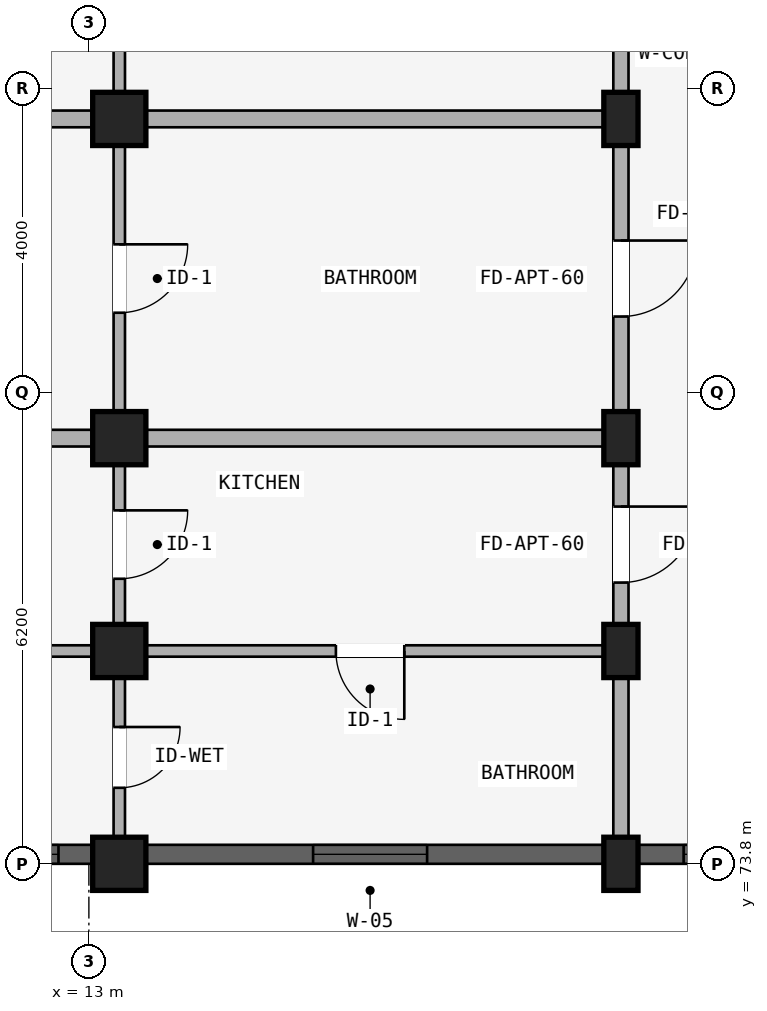
"""IFC4 building model, lengths in metres.
Left out: names, types, materials, properties, quantities, classifications, styles, units other than length and angle.
Written with IfcOpenShell. Run it as: python <this file> out.ifc"""

import sys

from ifc_helpers import new_model, si_unit, direction, frame, frame_2d, origin, origin_2d, place, context, subcontext, project, spatial, rectangle, extrude, element, fill, save


model = new_model("IFC4")
c1 = context("Model", 3, precision=1e-05, world=origin(), true_north=direction((0.0, 1.0)))
c2 = subcontext(c1, "Body", "Model", "MODEL_VIEW")
j1 = project(units=[si_unit("LENGTHUNIT", "METRE"), si_unit("PLANEANGLEUNIT", "RADIAN")], contexts=[c1])
p1 = place(None, origin())
s1 = spatial("IfcSite", under=j1, at=p1, CompositionType="ELEMENT")
p2 = place(p1, origin())
s2 = spatial("IfcBuilding", under=s1, at=p2, CompositionType="ELEMENT")
p3 = place(p2, frame((0.0, 0.0, 24.45)))
s3 = spatial("IfcBuildingStorey", under=s2, at=p3, CompositionType="ELEMENT", Elevation=24.45)
p4 = place(p3, frame((20.0, 83.6, 0.0), z_axis=(0.0, 0.0, 1.0), x_axis=(1.0, 0.0, 0.0)))
e1 = element("IfcColumn", 1, at=p4, inside=s3, PredefinedType="COLUMN", context=c2, shape_type="SweptSolid", body=[
    extrude(rectangle(XDim=0.45, YDim=0.7, at=origin_2d()), origin(), (0.0, 0.0, 1.0), 2.93),
])
p5 = place(p3, frame((13.4, 83.6, 0.0), z_axis=(0.0, 0.0, 1.0), x_axis=(1.0, 0.0, 0.0)))
e2 = element("IfcColumn", 2, at=p5, inside=s3, PredefinedType="COLUMN", context=c2, shape_type="SweptSolid", body=[
    extrude(rectangle(XDim=0.7, YDim=0.7, at=origin_2d()), origin(), (0.0, 0.0, 1.0), 2.93),
])
p6 = place(p3, frame((20.0, 79.4, 0.0), z_axis=(0.0, 0.0, 1.0), x_axis=(1.0, 0.0, 0.0)))
e3 = element("IfcColumn", 3, at=p6, inside=s3, PredefinedType="COLUMN", context=c2, shape_type="SweptSolid", body=[
    extrude(rectangle(XDim=0.45, YDim=0.7, at=origin_2d()), origin(), (0.0, 0.0, 1.0), 2.93),
])
p7 = place(p3, frame((13.4, 79.4, 0.0), z_axis=(0.0, 0.0, 1.0), x_axis=(1.0, 0.0, 0.0)))
e4 = element("IfcColumn", 4, at=p7, inside=s3, PredefinedType="COLUMN", context=c2, shape_type="SweptSolid", body=[
    extrude(rectangle(XDim=0.7, YDim=0.7, at=origin_2d()), origin(), (0.0, 0.0, 1.0), 2.93),
])
p8 = place(p3, frame((20.0, 76.6, 0.0), z_axis=(0.0, 0.0, 1.0), x_axis=(1.0, 0.0, 0.0)))
e5 = element("IfcColumn", 5, at=p8, inside=s3, PredefinedType="COLUMN", context=c2, shape_type="SweptSolid", body=[
    extrude(rectangle(XDim=0.45, YDim=0.7, at=origin_2d()), origin(), (0.0, 0.0, 1.0), 2.93),
])
p9 = place(p3, frame((13.4, 76.6, 0.0), z_axis=(0.0, 0.0, 1.0), x_axis=(1.0, 0.0, 0.0)))
e6 = element("IfcColumn", 6, at=p9, inside=s3, PredefinedType="COLUMN", context=c2, shape_type="SweptSolid", body=[
    extrude(rectangle(XDim=0.7, YDim=0.7, at=origin_2d()), origin(), (0.0, 0.0, 1.0), 2.93),
])
p10 = place(p3, frame((20.0, 73.8, 0.0), z_axis=(0.0, 0.0, 1.0), x_axis=(1.0, 0.0, 0.0)))
e7 = element("IfcColumn", 7, at=p10, inside=s3, PredefinedType="COLUMN", context=c2, shape_type="SweptSolid", body=[
    extrude(rectangle(XDim=0.45, YDim=0.7, at=origin_2d()), origin(), (0.0, 0.0, 1.0), 2.97),
])
p11 = place(p3, frame((13.4, 73.8, 0.0), z_axis=(0.0, 0.0, 1.0), x_axis=(1.0, 0.0, 0.0)))
e8 = element("IfcColumn", 8, at=p11, inside=s3, PredefinedType="COLUMN", context=c2, shape_type="SweptSolid", body=[
    extrude(rectangle(XDim=0.7, YDim=0.7, at=origin_2d()), origin(), (0.0, 0.0, 1.0), 2.97),
])
p12 = place(p3, frame((20.0, 87.65, 0.0), z_axis=(0.0, 0.0, 1.0), x_axis=(0.0, -1.0, 0.0)))
e9 = element("IfcWall", 9, at=p12, inside=s3, PredefinedType="STANDARD", context=c2, shape_type="SweptSolid", body=[
    extrude(rectangle(XDim=4.05, YDim=0.2, at=frame_2d((2.025, 0.0))), origin(), (0.0, 0.0, 1.0), 2.372),
])
p13 = place(p12, frame((1.525, 0.0, 0.0)))
e10 = element("IfcOpeningElement", 10, at=p13, cuts=e9, PredefinedType="OPENING", context=c2, shape_type="SweptSolid", body=[
    extrude(rectangle(XDim=1.0, YDim=2.15, at=frame_2d((0.5, 1.075))), frame((0.0, 0.11, 0.0), z_axis=(0.0, -1.0, 0.0), x_axis=(1.0, 0.0, 0.0)), (0.0, 0.0, 1.0), 0.22),
])
p14 = place(p3, frame((13.4, 87.57, 0.0), z_axis=(0.0, 0.0, 1.0), x_axis=(0.0, -1.0, 0.0)))
e11 = element("IfcWall", 11, at=p14, inside=s3, PredefinedType="PARTITIONING", context=c2, shape_type="SweptSolid", body=[
    extrude(rectangle(XDim=3.89, YDim=0.15, at=frame_2d((1.945, 0.0))), origin(), (0.0, 0.0, 1.0), 2.372),
])
p15 = place(p14, frame((1.495, 0.0, 0.0)))
e12 = element("IfcOpeningElement", 12, at=p15, cuts=e11, PredefinedType="OPENING", context=c2, shape_type="SweptSolid", body=[
    extrude(rectangle(XDim=0.9, YDim=2.1, at=frame_2d((0.45, 1.05))), frame((0.0, 0.085, 0.0), z_axis=(0.0, -1.0, 0.0), x_axis=(1.0, 0.0, 0.0)), (0.0, 0.0, 1.0), 0.17),
])
p16 = place(p3, frame((20.0, 83.6, 0.0), z_axis=(0.0, 0.0, 1.0), x_axis=(0.0, -1.0, 0.0)))
e13 = element("IfcWall", 13, at=p16, inside=s3, PredefinedType="STANDARD", context=c2, shape_type="SweptSolid", body=[
    extrude(rectangle(XDim=4.2, YDim=0.2, at=frame_2d((2.1, 0.0))), origin(), (0.0, 0.0, 1.0), 2.372),
])
p17 = place(p16, frame((1.6, 0.0, 0.0)))
e14 = element("IfcOpeningElement", 14, at=p17, cuts=e13, PredefinedType="OPENING", context=c2, shape_type="SweptSolid", body=[
    extrude(rectangle(XDim=1.0, YDim=2.15, at=frame_2d((0.5, 1.075))), frame((0.0, 0.11, 0.0), z_axis=(0.0, -1.0, 0.0), x_axis=(1.0, 0.0, 0.0)), (0.0, 0.0, 1.0), 0.22),
])
p18 = place(p3, frame((13.4, 83.52, 0.0), z_axis=(0.0, 0.0, 1.0), x_axis=(0.0, -1.0, 0.0)))
e15 = element("IfcWall", 15, at=p18, inside=s3, PredefinedType="PARTITIONING", context=c2, shape_type="SweptSolid", body=[
    extrude(rectangle(XDim=4.04, YDim=0.15, at=frame_2d((2.02, 0.0))), origin(), (0.0, 0.0, 1.0), 2.372),
])
p19 = place(p18, frame((1.57, 0.0, 0.0)))
e16 = element("IfcOpeningElement", 16, at=p19, cuts=e15, PredefinedType="OPENING", context=c2, shape_type="SweptSolid", body=[
    extrude(rectangle(XDim=0.9, YDim=2.1, at=frame_2d((0.45, 1.05))), frame((0.0, 0.085, 0.0), z_axis=(0.0, -1.0, 0.0), x_axis=(1.0, 0.0, 0.0)), (0.0, 0.0, 1.0), 0.17),
])
p20 = place(p3, frame((19.95, 83.6, 0.0), z_axis=(0.0, 0.0, 1.0), x_axis=(-1.0, 0.0, 0.0)))
e17 = element("IfcWall", 17, at=p20, inside=s3, PredefinedType="STANDARD", context=c2, shape_type="SweptSolid", body=[
    extrude(rectangle(XDim=17.53, YDim=0.22, at=frame_2d((8.765, 0.0))), origin(), (0.0, 0.0, 1.0), 2.372),
])
p21 = place(p3, frame((20.0, 79.4, 0.0), z_axis=(0.0, 0.0, 1.0), x_axis=(0.0, -1.0, 0.0)))
e18 = element("IfcWall", 18, at=p21, inside=s3, PredefinedType="STANDARD", context=c2, shape_type="SweptSolid", body=[
    extrude(rectangle(XDim=2.8, YDim=0.2, at=frame_2d((1.4, 0.0))), origin(), (0.0, 0.0, 1.0), 2.372),
])
p22 = place(p21, frame((0.9, 0.0, 0.0)))
e19 = element("IfcOpeningElement", 19, at=p22, cuts=e18, PredefinedType="OPENING", context=c2, shape_type="SweptSolid", body=[
    extrude(rectangle(XDim=1.0, YDim=2.15, at=frame_2d((0.5, 1.075))), frame((0.0, 0.11, 0.0), z_axis=(0.0, -1.0, 0.0), x_axis=(1.0, 0.0, 0.0)), (0.0, 0.0, 1.0), 0.22),
])
p23 = place(p3, frame((13.4, 79.32, 0.0), z_axis=(0.0, 0.0, 1.0), x_axis=(0.0, -1.0, 0.0)))
e20 = element("IfcWall", 20, at=p23, inside=s3, PredefinedType="PLUMBINGWALL", context=c2, shape_type="SweptSolid", body=[
    extrude(rectangle(XDim=2.64, YDim=0.15, at=frame_2d((1.32, 0.0))), origin(), (0.0, 0.0, 1.0), 2.372),
])
p24 = place(p23, frame((0.87, 0.0, 0.0)))
e21 = element("IfcOpeningElement", 21, at=p24, cuts=e20, PredefinedType="OPENING", context=c2, shape_type="SweptSolid", body=[
    extrude(rectangle(XDim=0.9, YDim=2.1, at=frame_2d((0.45, 1.05))), frame((0.0, 0.085, 0.0), z_axis=(0.0, -1.0, 0.0), x_axis=(1.0, 0.0, 0.0)), (0.0, 0.0, 1.0), 0.17),
])
p25 = place(p3, frame((19.9, 79.4, 0.0), z_axis=(0.0, 0.0, 1.0), x_axis=(-1.0, 0.0, 0.0)))
e22 = element("IfcWall", 22, at=p25, inside=s3, PredefinedType="STANDARD", context=c2, shape_type="SweptSolid", body=[
    extrude(rectangle(XDim=17.42, YDim=0.22, at=frame_2d((8.71, 0.0))), origin(), (0.0, 0.0, 1.0), 2.372),
])
p26 = place(p3, frame((20.0, 76.6, 0.0), z_axis=(0.0, 0.0, 1.0), x_axis=(0.0, -1.0, 0.0)))
e23 = element("IfcWall", 23, at=p26, inside=s3, PredefinedType="STANDARD", context=c2, shape_type="SweptSolid", body=[
    extrude(rectangle(XDim=2.8, YDim=0.2, at=frame_2d((1.4, 0.0))), origin(), (0.0, 0.0, 1.0), 2.372),
])
p27 = place(p3, frame((13.4, 76.52, 0.0), z_axis=(0.0, 0.0, 1.0), x_axis=(0.0, -1.0, 0.0)))
e24 = element("IfcWall", 24, at=p27, inside=s3, PredefinedType="PLUMBINGWALL", context=c2, shape_type="SweptSolid", body=[
    extrude(rectangle(XDim=2.64, YDim=0.15, at=frame_2d((1.32, 0.0))), origin(), (0.0, 0.0, 1.0), 2.372),
])
p28 = place(p27, frame((0.92, 0.0, 0.0)))
e25 = element("IfcOpeningElement", 25, at=p28, cuts=e24, PredefinedType="OPENING", context=c2, shape_type="SweptSolid", body=[
    extrude(rectangle(XDim=0.8, YDim=2.1, at=frame_2d((0.4, 1.05))), frame((0.0, 0.085, 0.0), z_axis=(0.0, -1.0, 0.0), x_axis=(1.0, 0.0, 0.0)), (0.0, 0.0, 1.0), 0.17),
])
p29 = place(p3, frame((19.9, 76.6, 0.0), z_axis=(0.0, 0.0, 1.0), x_axis=(-1.0, 0.0, 0.0)))
e26 = element("IfcWall", 26, at=p29, inside=s3, PredefinedType="PARTITIONING", context=c2, shape_type="SweptSolid", body=[
    extrude(rectangle(XDim=17.42, YDim=0.15, at=frame_2d((8.71, 0.0))), origin(), (0.0, 0.0, 1.0), 2.372),
])
p30 = place(p29, frame((2.75, 0.0, 0.0)))
e27 = element("IfcOpeningElement", 27, at=p30, cuts=e26, PredefinedType="OPENING", context=c2, shape_type="SweptSolid", body=[
    extrude(rectangle(XDim=0.9, YDim=2.1, at=frame_2d((0.45, 1.05))), frame((0.0, 0.085, 0.0), z_axis=(0.0, -1.0, 0.0), x_axis=(1.0, 0.0, 0.0)), (0.0, 0.0, 1.0), 0.17),
])
p31 = place(p3, frame((22.171, 73.925, 0.0), z_axis=(0.0, 0.0, 1.0), x_axis=(-1.0, 0.0, 0.0)))
e28 = element("IfcWall", 28, at=p31, inside=s3, PredefinedType="STANDARD", context=c2, shape_type="SweptSolid", body=[
    extrude(rectangle(XDim=1.943, YDim=0.25, at=frame_2d((0.971, 0.0))), origin(), (0.0, 0.0, 1.0), 2.372),
])
p32 = place(p31, frame((0.596, 0.0, 0.88)))
e29 = element("IfcOpeningElement", 29, at=p32, cuts=e28, PredefinedType="OPENING", context=c2, shape_type="SweptSolid", body=[
    extrude(rectangle(XDim=0.75, YDim=1.05, at=frame_2d((0.375, 0.525))), frame((0.0, 0.135, 0.0), z_axis=(0.0, -1.0, 0.0), x_axis=(1.0, 0.0, 0.0)), (0.0, 0.0, 1.0), 0.27),
])
p33 = place(p3, frame((19.771, 73.925, 0.0), z_axis=(0.0, 0.0, 1.0), x_axis=(-1.0, 0.0, 0.0)))
e30 = element("IfcWall", 30, at=p33, inside=s3, PredefinedType="STANDARD", context=c2, shape_type="SweptSolid", body=[
    extrude(rectangle(XDim=6.018, YDim=0.25, at=frame_2d((3.009, 0.0))), origin(), (0.0, 0.0, 1.0), 2.372),
])
p34 = place(p33, frame((2.322, 0.0, 0.522)))
e31 = element("IfcOpeningElement", 31, at=p34, cuts=e30, PredefinedType="OPENING", context=c2, shape_type="SweptSolid", body=[
    extrude(rectangle(XDim=1.5, YDim=1.65, at=frame_2d((0.75, 0.825))), frame((0.0, 0.135, 0.0), z_axis=(0.0, -1.0, 0.0), x_axis=(1.0, 0.0, 0.0)), (0.0, 0.0, 1.0), 0.27),
])
p35 = place(p3, frame((13.046, 73.925, 0.0), z_axis=(0.0, 0.0, 1.0), x_axis=(-1.0, 0.0, 0.0)))
e32 = element("IfcWall", 32, at=p35, inside=s3, PredefinedType="STANDARD", context=c2, shape_type="SweptSolid", body=[
    extrude(rectangle(XDim=2.093, YDim=0.25, at=frame_2d((1.046, 0.0))), origin(), (0.0, 0.0, 1.0), 2.372),
])
p36 = place(p35, frame((0.447, 0.0, 0.672)))
e33 = element("IfcOpeningElement", 33, at=p36, cuts=e32, PredefinedType="OPENING", context=c2, shape_type="SweptSolid", body=[
    extrude(rectangle(XDim=1.2, YDim=1.5, at=frame_2d((0.6, 0.75))), frame((0.0, 0.135, 0.0), z_axis=(0.0, -1.0, 0.0), x_axis=(1.0, 0.0, 0.0)), (0.0, 0.0, 1.0), 0.27),
])
p37 = place(p32, origin())
e34 = element("IfcWindow", 34, at=p37, inside=s3, PartitioningType="SINGLE_PANEL", PredefinedType="WINDOW", context=c2, shape_type="SweptSolid", body=[
    extrude(rectangle(XDim=0.75, YDim=1.05, at=frame_2d((0.375, 0.525))), frame((0.0, 0.03, 0.0), z_axis=(0.0, -1.0, 0.0), x_axis=(1.0, 0.0, 0.0)), (0.0, 0.0, 1.0), 0.06),
])
fill(e29, e34)
p38 = place(p34, origin())
e35 = element("IfcWindow", 35, at=p38, inside=s3, PartitioningType="DOUBLE_PANEL_VERTICAL", PredefinedType="WINDOW", context=c2, shape_type="SweptSolid", body=[
    extrude(rectangle(XDim=1.5, YDim=1.65, at=frame_2d((0.75, 0.825))), frame((0.0, 0.03, 0.0), z_axis=(0.0, -1.0, 0.0), x_axis=(1.0, 0.0, 0.0)), (0.0, 0.0, 1.0), 0.06),
])
fill(e31, e35)
p39 = place(p36, origin())
e36 = element("IfcWindow", 36, at=p39, inside=s3, PartitioningType="SINGLE_PANEL", PredefinedType="WINDOW", context=c2, shape_type="SweptSolid", body=[
    extrude(rectangle(XDim=1.2, YDim=1.5, at=frame_2d((0.6, 0.75))), frame((0.0, 0.03, 0.0), z_axis=(0.0, -1.0, 0.0), x_axis=(1.0, 0.0, 0.0)), (0.0, 0.0, 1.0), 0.06),
])
fill(e33, e36)
p40 = place(p17, origin())
e37 = element("IfcDoor", 37, at=p40, inside=s3, OperationType="SINGLE_SWING_LEFT", PredefinedType="DOOR", context=c2, shape_type="SweptSolid", body=[
    extrude(rectangle(XDim=1.0, YDim=2.15, at=frame_2d((0.5, 1.075))), frame((0.0, 0.025, 0.0), z_axis=(0.0, -1.0, 0.0), x_axis=(1.0, 0.0, 0.0)), (0.0, 0.0, 1.0), 0.05),
])
fill(e14, e37)
p41 = place(p19, frame((0.9, 0.0, 0.0), z_axis=(0.0, 0.0, 1.0), x_axis=(-1.0, 0.0, 0.0)))
e38 = element("IfcDoor", 38, at=p41, inside=s3, OperationType="SINGLE_SWING_RIGHT", PredefinedType="DOOR", context=c2, shape_type="SweptSolid", body=[
    extrude(rectangle(XDim=0.9, YDim=2.1, at=frame_2d((0.45, 1.05))), frame((0.0, 0.025, 0.0), z_axis=(0.0, -1.0, 0.0), x_axis=(1.0, 0.0, 0.0)), (0.0, 0.0, 1.0), 0.05),
])
fill(e16, e38)
p42 = place(p24, frame((0.9, 0.0, 0.0), z_axis=(0.0, 0.0, 1.0), x_axis=(-1.0, 0.0, 0.0)))
e39 = element("IfcDoor", 39, at=p42, inside=s3, OperationType="SINGLE_SWING_RIGHT", PredefinedType="DOOR", context=c2, shape_type="SweptSolid", body=[
    extrude(rectangle(XDim=0.9, YDim=2.1, at=frame_2d((0.45, 1.05))), frame((0.0, 0.025, 0.0), z_axis=(0.0, -1.0, 0.0), x_axis=(1.0, 0.0, 0.0)), (0.0, 0.0, 1.0), 0.05),
])
fill(e21, e39)
p43 = place(p22, origin())
e40 = element("IfcDoor", 40, at=p43, inside=s3, OperationType="SINGLE_SWING_LEFT", PredefinedType="DOOR", context=c2, shape_type="SweptSolid", body=[
    extrude(rectangle(XDim=1.0, YDim=2.15, at=frame_2d((0.5, 1.075))), frame((0.0, 0.025, 0.0), z_axis=(0.0, -1.0, 0.0), x_axis=(1.0, 0.0, 0.0)), (0.0, 0.0, 1.0), 0.05),
])
fill(e19, e40)
p44 = place(p28, frame((0.8, 0.0, 0.0), z_axis=(0.0, 0.0, 1.0), x_axis=(-1.0, 0.0, 0.0)))
e41 = element("IfcDoor", 41, at=p44, inside=s3, OperationType="SINGLE_SWING_RIGHT", PredefinedType="DOOR", context=c2, shape_type="SweptSolid", body=[
    extrude(rectangle(XDim=0.8, YDim=2.1, at=frame_2d((0.4, 1.05))), frame((0.0, 0.025, 0.0), z_axis=(0.0, -1.0, 0.0), x_axis=(1.0, 0.0, 0.0)), (0.0, 0.0, 1.0), 0.05),
])
fill(e25, e41)
p45 = place(p30, frame((0.9, 0.0, 0.0), z_axis=(0.0, 0.0, 1.0), x_axis=(-1.0, 0.0, 0.0)))
e42 = element("IfcDoor", 42, at=p45, inside=s3, OperationType="SINGLE_SWING_RIGHT", PredefinedType="DOOR", context=c2, shape_type="SweptSolid", body=[
    extrude(rectangle(XDim=0.9, YDim=2.1, at=frame_2d((0.45, 1.05))), frame((0.0, 0.025, 0.0), z_axis=(0.0, -1.0, 0.0), x_axis=(1.0, 0.0, 0.0)), (0.0, 0.0, 1.0), 0.05),
])
fill(e27, e42)
save(model, sys.argv[1])
